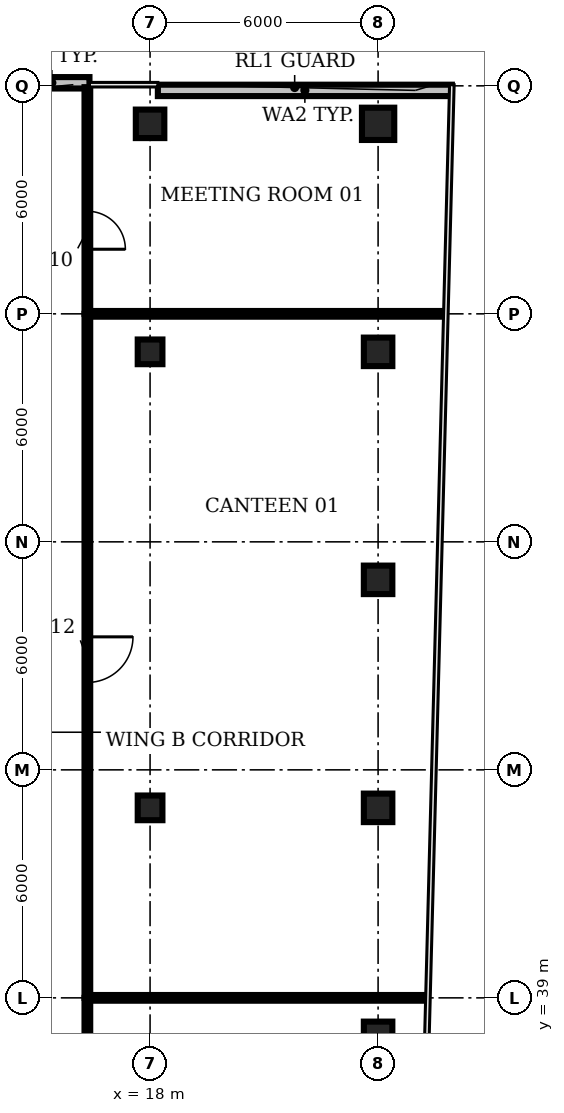
"""IFC4 building model, lengths in metres.
Left out: names, types, materials, properties, quantities, classifications, styles, units other than length and angle.
Written with IfcOpenShell. Run it as: python <this file> out.ifc"""

import sys

from ifc_helpers import new_model, si_unit, direction, frame, frame_2d, origin, origin_2d, place, context, subcontext, project, spatial, rectangle, circle, extrude, element, fill, save


model = new_model("IFC4")
c1 = context("Model", 3, precision=1e-05, world=origin(), true_north=direction((0.0, 1.0)))
c2 = subcontext(c1, "Body", "Model", "MODEL_VIEW")
j1 = project(units=[si_unit("LENGTHUNIT", "METRE"), si_unit("PLANEANGLEUNIT", "RADIAN")], contexts=[c1])
p1 = place(None, origin())
s1 = spatial("IfcSite", under=j1, at=p1, CompositionType="ELEMENT")
p2 = place(p1, origin())
s2 = spatial("IfcBuilding", under=s1, at=p2, CompositionType="ELEMENT")
p3 = place(p2, frame((0.0, 0.0, 281.0)))
s3 = spatial("IfcBuildingStorey", under=s2, at=p3, CompositionType="ELEMENT", Elevation=281.0)
for number, where, z_axis, x_axis in (
    (1, (18.0, 44.0, 0.0), (0.0, 0.0, 1.0), (1.0, 0.0, 0.0)),
    (2, (18.0, 56.0, 0.0), (0.0, 0.0, 1.0), (1.0, 0.0, 0.0)),
):
    element("IfcColumn", number, at=place(p3, frame(where, z_axis=z_axis, x_axis=x_axis)), inside=s3, PredefinedType="COLUMN", context=c2, shape_type="SweptSolid", body=[
        extrude(rectangle(XDim=0.65, YDim=0.65, at=origin_2d()), origin(), (0.0, 0.0, 1.0), 3.85),
    ])
for number, where, z_axis, x_axis in (
    (3, (18.0, 62.0, 0.0), (0.0, 0.0, 1.0), (1.0, 0.0, 0.0)),
    (4, (24.0, 38.0, 0.0), (0.0, 0.0, 1.0), (1.0, 0.0, 0.0)),
    (5, (24.0, 44.0, 0.0), (0.0, 0.0, 1.0), (1.0, 0.0, 0.0)),
    (6, (24.0, 50.0, 0.0), (0.0, 0.0, 1.0), (1.0, 0.0, 0.0)),
    (7, (24.0, 56.0, 0.0), (0.0, 0.0, 1.0), (1.0, 0.0, 0.0)),
):
    element("IfcColumn", number, at=place(p3, frame(where, z_axis=z_axis, x_axis=x_axis)), inside=s3, PredefinedType="COLUMN", context=c2, shape_type="SweptSolid", body=[
        extrude(rectangle(XDim=0.75, YDim=0.75, at=origin_2d()), origin(), (0.0, 0.0, 1.0), 3.85),
    ])
p4 = place(p3, frame((24.0, 62.0, 0.0), z_axis=(0.0, 0.0, 1.0), x_axis=(1.0, 0.0, 0.0)))
e8 = element("IfcColumn", 8, at=p4, inside=s3, PredefinedType="COLUMN", context=c2, shape_type="SweptSolid", body=[
    extrude(circle(Radius=0.425, at=origin_2d()), origin(), (0.0, 0.0, 1.0), 3.85),
])
p5 = place(p3, frame((25.941, 62.88, 0.0), z_axis=(0.0, 0.0, 1.0), x_axis=(-1.0, 0.0, 0.0)))
e9 = element("IfcWall", 9, at=p5, inside=s3, PredefinedType="SOLIDWALL", context=c2, shape_type="SweptSolid", body=[
    extrude(rectangle(XDim=7.736, YDim=0.3, at=frame_2d((3.868, 0.0))), origin(), (0.0, 0.0, 1.0), 3.85),
])
p6 = place(p3, frame((16.405, 63.08, 0.0), z_axis=(0.0, 0.0, 1.0), x_axis=(-1.0, 0.0, 0.0)))
e10 = element("IfcWall", 10, at=p6, inside=s3, PredefinedType="SOLIDWALL", context=c2, shape_type="SweptSolid", body=[
    extrude(rectangle(XDim=1.979, YDim=0.3, at=frame_2d((0.989, 0.0))), origin(), (0.0, 0.0, 1.0), 3.85),
])
p7 = place(p3, frame((16.35, 39.0, 0.0), z_axis=(0.0, 0.0, 1.0), x_axis=(0.0, -1.0, 0.0)))
e11 = element("IfcWall", 11, at=p7, inside=s3, PredefinedType="PARTITIONING", context=c2, shape_type="SweptSolid", body=[
    extrude(rectangle(XDim=5.2, YDim=0.15, at=frame_2d((2.6, 0.0))), origin(), (0.0, 0.0, 1.0), 2.9),
])
p8 = place(p7, frame((2.2, 0.0, 0.0)))
e12 = element("IfcOpeningElement", 12, at=p8, cuts=e11, PredefinedType="OPENING", context=c2, shape_type="SweptSolid", body=[
    extrude(rectangle(XDim=1.0, YDim=2.1, at=frame_2d((0.5, 1.05))), frame((0.0, 0.085, 0.0), z_axis=(0.0, -1.0, 0.0), x_axis=(1.0, 0.0, 0.0)), (0.0, 0.0, 1.0), 0.17),
])
p9 = place(p3, frame((16.35, 39.0, 0.0), z_axis=(0.0, 0.0, 1.0), x_axis=(1.0, 0.0, 0.0)))
e13 = element("IfcWall", 13, at=p9, inside=s3, PredefinedType="PARTITIONING", context=c2, shape_type="SweptSolid", body=[
    extrude(rectangle(XDim=8.91, YDim=0.15, at=frame_2d((4.455, 0.0))), origin(), (0.0, 0.0, 1.0), 2.9),
])
p10 = place(p3, frame((16.35, 57.0, 0.0), z_axis=(0.0, 0.0, 1.0), x_axis=(0.0, -1.0, 0.0)))
e14 = element("IfcWall", 14, at=p10, inside=s3, PredefinedType="PARTITIONING", context=c2, shape_type="SweptSolid", body=[
    extrude(rectangle(XDim=18.0, YDim=0.15, at=frame_2d((9.0, 0.0))), origin(), (0.0, 0.0, 1.0), 2.9),
])
p11 = place(p10, frame((8.5, 0.0, 0.0)))
e15 = element("IfcOpeningElement", 15, at=p11, cuts=e14, PredefinedType="OPENING", context=c2, shape_type="SweptSolid", body=[
    extrude(rectangle(XDim=1.2, YDim=2.1, at=frame_2d((0.6, 1.05))), frame((0.0, 0.085, 0.0), z_axis=(0.0, -1.0, 0.0), x_axis=(1.0, 0.0, 0.0)), (0.0, 0.0, 1.0), 0.17),
])
p12 = place(p3, frame((16.35, 57.0, 0.0), z_axis=(0.0, 0.0, 1.0), x_axis=(1.0, 0.0, 0.0)))
e16 = element("IfcWall", 16, at=p12, inside=s3, PredefinedType="PARTITIONING", context=c2, shape_type="SweptSolid", body=[
    extrude(rectangle(XDim=9.38, YDim=0.15, at=frame_2d((4.69, 0.0))), origin(), (0.0, 0.0, 1.0), 2.9),
])
p13 = place(p3, frame((16.35, 62.965, 0.0), z_axis=(0.0, 0.0, 1.0), x_axis=(0.0, -1.0, 0.0)))
e17 = element("IfcWall", 17, at=p13, inside=s3, PredefinedType="PARTITIONING", context=c2, shape_type="SweptSolid", body=[
    extrude(rectangle(XDim=5.965, YDim=0.15, at=frame_2d((2.982, 0.0))), origin(), (0.0, 0.0, 1.0), 2.9),
])
p14 = place(p13, frame((3.265, 0.0, 0.0)))
e18 = element("IfcOpeningElement", 18, at=p14, cuts=e17, PredefinedType="OPENING", context=c2, shape_type="SweptSolid", body=[
    extrude(rectangle(XDim=1.0, YDim=2.1, at=frame_2d((0.5, 1.05))), frame((0.0, 0.085, 0.0), z_axis=(0.0, -1.0, 0.0), x_axis=(1.0, 0.0, 0.0)), (0.0, 0.0, 1.0), 0.17),
])
p15 = place(p11, origin())
e19 = element("IfcDoor", 19, at=p15, inside=s3, OperationType="SINGLE_SWING_LEFT", PredefinedType="DOOR", context=c2, shape_type="SweptSolid", body=[
    extrude(rectangle(XDim=1.2, YDim=2.1, at=frame_2d((0.6, 1.05))), frame((0.0, 0.025, 0.0), z_axis=(0.0, -1.0, 0.0), x_axis=(1.0, 0.0, 0.0)), (0.0, 0.0, 1.0), 0.05),
])
fill(e15, e19)
p16 = place(p14, origin())
e20 = element("IfcDoor", 20, at=p16, inside=s3, OperationType="SINGLE_SWING_RIGHT", PredefinedType="DOOR", context=c2, shape_type="SweptSolid", body=[
    extrude(rectangle(XDim=1.0, YDim=2.1, at=frame_2d((0.5, 1.05))), frame((0.0, 0.025, 0.0), z_axis=(0.0, -1.0, 0.0), x_axis=(1.0, 0.0, 0.0)), (0.0, 0.0, 1.0), 0.05),
])
fill(e18, e20)
save(model, sys.argv[1])
